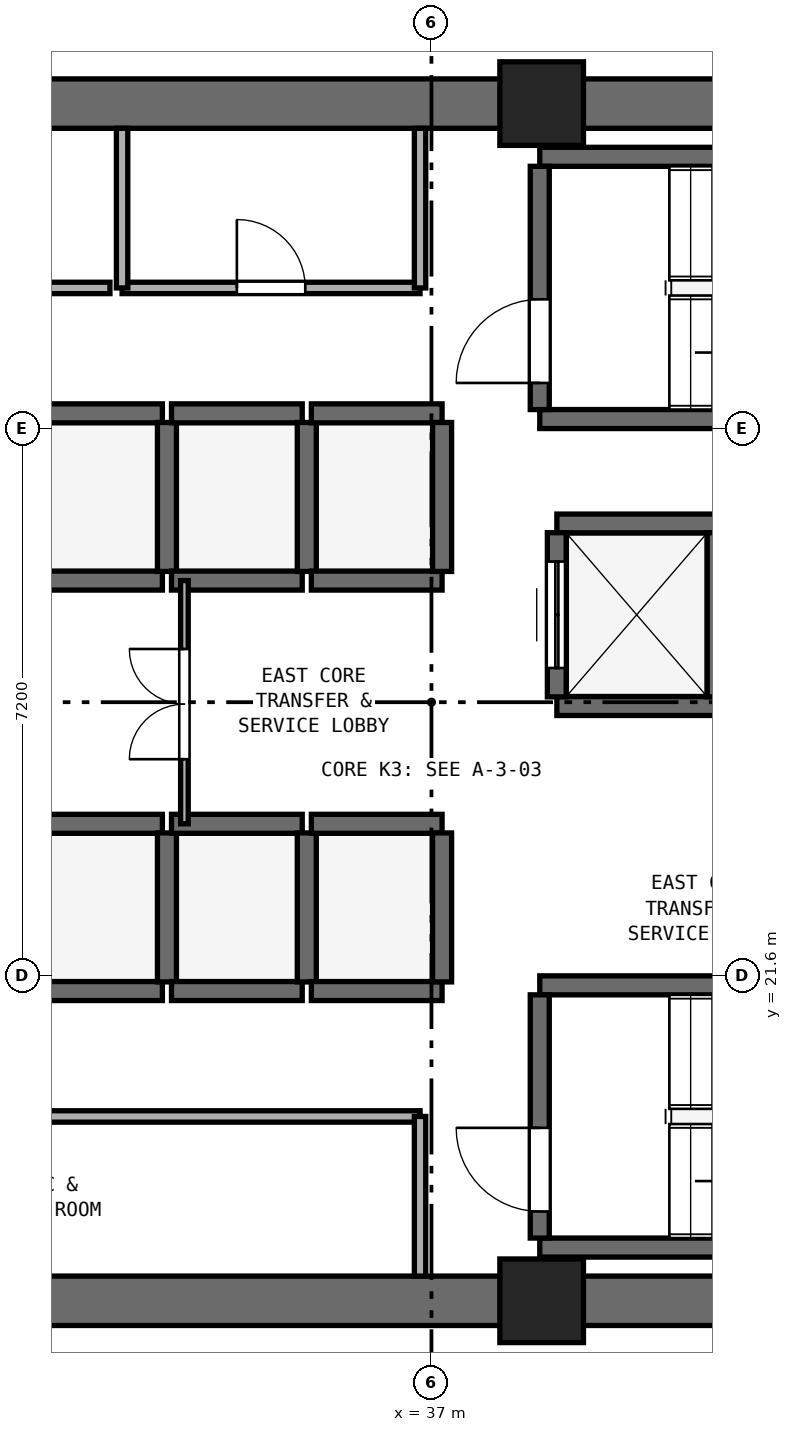
"""IFC4 building model, lengths in metres.
Left out: names, types, materials, properties, quantities, classifications, styles, units other than length and angle.
Written with IfcOpenShell. Run it as: python <this file> out.ifc"""

import sys

from ifc_helpers import new_model, si_unit, direction, frame, frame_2d, origin, origin_2d, place, context, subcontext, project, spatial, rectangle, extrude, element, fill, save


model = new_model("IFC4")
c1 = context("Model", 3, precision=1e-05, world=origin(), true_north=direction((0.0, 1.0)))
c2 = subcontext(c1, "Body", "Model", "MODEL_VIEW")
j1 = project(units=[si_unit("LENGTHUNIT", "METRE"), si_unit("PLANEANGLEUNIT", "RADIAN")], contexts=[c1])
p1 = place(None, origin())
s1 = spatial("IfcSite", under=j1, at=p1, CompositionType="ELEMENT")
p2 = place(p1, origin())
s2 = spatial("IfcBuilding", under=s1, at=p2, CompositionType="ELEMENT")
p3 = place(p2, frame((0.0, 0.0, 93.4)))
s3 = spatial("IfcBuildingStorey", under=s2, at=p3, CompositionType="ELEMENT", Elevation=93.4)
for number, where, z_axis, x_axis in (
    (1, (25.4, 17.325, 0.0), (0.0, 0.0, 1.0), (1.0, 0.0, 0.0)),
    (2, (25.4, 33.075, 0.0), (0.0, 0.0, 1.0), (1.0, 0.0, 0.0)),
):
    element("IfcWall", number, at=place(p3, frame(where, z_axis=z_axis, x_axis=x_axis)), inside=s3, PredefinedType="SHEAR", context=c2, shape_type="SweptSolid", body=[
        extrude(rectangle(XDim=23.2, YDim=0.65, at=frame_2d((11.6, 0.0))), origin(), (0.0, 0.0, 1.0), 3.525),
    ])
for number, where, z_axis, x_axis in (
    (3, (38.45, 17.325, 0.0), (0.0, 0.0, 1.0), (1.0, 0.0, 0.0)),
    (4, (38.45, 33.075, 0.0), (0.0, 0.0, 1.0), (1.0, 0.0, 0.0)),
):
    element("IfcColumn", number, at=place(p3, frame(where, z_axis=z_axis, x_axis=x_axis)), inside=s3, PredefinedType="PILASTER", context=c2, shape_type="SweptSolid", body=[
        extrude(rectangle(XDim=1.1, YDim=1.1, at=origin_2d()), origin(), (0.0, 0.0, 1.0), 3.8),
    ])
for number, where, z_axis, x_axis in (
    (5, (38.425, 28.925, 0.0), (0.0, 0.0, 1.0), (1.0, 0.0, 0.0)),
    (6, (38.425, 32.375, 0.0), (0.0, 0.0, 1.0), (1.0, 0.0, 0.0)),
):
    element("IfcWall", number, at=place(p3, frame(where, z_axis=z_axis, x_axis=x_axis)), inside=s3, PredefinedType="SHEAR", context=c2, shape_type="SweptSolid", body=[
        extrude(rectangle(XDim=7.3, YDim=0.25, at=frame_2d((3.65, 0.0))), origin(), (0.0, 0.0, 1.0), 3.525),
    ])
p4 = place(p3, frame((38.425, 29.05, 0.0), z_axis=(0.0, 0.0, 1.0), x_axis=(0.0, 1.0, 0.0)))
e7 = element("IfcWall", 7, at=p4, inside=s3, PredefinedType="SHEAR", context=c2, shape_type="SweptSolid", body=[
    extrude(rectangle(XDim=3.2, YDim=0.25, at=frame_2d((1.6, 0.0))), origin(), (0.0, 0.0, 1.0), 3.525),
])
p5 = place(p4, frame((0.35, 0.0, 0.0)))
e8 = element("IfcOpeningElement", 8, at=p5, cuts=e7, PredefinedType="OPENING", context=c2, shape_type="SweptSolid", body=[
    extrude(rectangle(XDim=1.1, YDim=2.15, at=frame_2d((0.55, 1.075))), frame((0.0, 0.135, 0.0), z_axis=(0.0, -1.0, 0.0), x_axis=(1.0, 0.0, 0.0)), (0.0, 0.0, 1.0), 0.27),
])
for number, where, z_axis, x_axis in (
    (9, (38.425, 18.025, 0.0), (0.0, 0.0, 1.0), (1.0, 0.0, 0.0)),
    (10, (38.425, 21.475, 0.0), (0.0, 0.0, 1.0), (1.0, 0.0, 0.0)),
):
    element("IfcWall", number, at=place(p3, frame(where, z_axis=z_axis, x_axis=x_axis)), inside=s3, PredefinedType="SHEAR", context=c2, shape_type="SweptSolid", body=[
        extrude(rectangle(XDim=7.3, YDim=0.25, at=frame_2d((3.65, 0.0))), origin(), (0.0, 0.0, 1.0), 3.525),
    ])
p6 = place(p3, frame((38.425, 18.15, 0.0), z_axis=(0.0, 0.0, 1.0), x_axis=(0.0, 1.0, 0.0)))
e11 = element("IfcWall", 11, at=p6, inside=s3, PredefinedType="SHEAR", context=c2, shape_type="SweptSolid", body=[
    extrude(rectangle(XDim=3.2, YDim=0.25, at=frame_2d((1.6, 0.0))), origin(), (0.0, 0.0, 1.0), 3.525),
])
p7 = place(p6, frame((0.35, 0.0, 0.0)))
e12 = element("IfcOpeningElement", 12, at=p7, cuts=e11, PredefinedType="OPENING", context=c2, shape_type="SweptSolid", body=[
    extrude(rectangle(XDim=1.1, YDim=2.15, at=frame_2d((0.55, 1.075))), frame((0.0, 0.135, 0.0), z_axis=(0.0, -1.0, 0.0), x_axis=(1.0, 0.0, 0.0)), (0.0, 0.0, 1.0), 0.27),
])
for number, where, z_axis, x_axis in (
    (13, (31.74, 21.4, 0.0), (0.0, 0.0, 1.0), (1.0, 0.0, 0.0)),
    (14, (31.74, 23.6, 0.0), (0.0, 0.0, 1.0), (1.0, 0.0, 0.0)),
):
    element("IfcWall", number, at=place(p3, frame(where, z_axis=z_axis, x_axis=x_axis)), inside=s3, PredefinedType="SHEAR", context=c2, shape_type="SweptSolid", body=[
        extrude(rectangle(XDim=1.72, YDim=0.25, at=frame_2d((0.86, 0.0))), origin(), (0.0, 0.0, 1.0), 3.525),
    ])
p8 = place(p3, frame((33.52, 21.52, 0.0), z_axis=(0.0, 0.0, 1.0), x_axis=(0.0, 1.0, 0.0)))
e15 = element("IfcWall", 15, at=p8, inside=s3, PredefinedType="SHEAR", context=c2, shape_type="SweptSolid", body=[
    extrude(rectangle(XDim=1.96, YDim=0.25, at=frame_2d((0.98, 0.0))), origin(), (0.0, 0.0, 1.0), 3.525),
])
for number, where, z_axis, x_axis in (
    (16, (33.58, 21.4, 0.0), (0.0, 0.0, 1.0), (1.0, 0.0, 0.0)),
    (17, (33.58, 23.6, 0.0), (0.0, 0.0, 1.0), (1.0, 0.0, 0.0)),
):
    element("IfcWall", number, at=place(p3, frame(where, z_axis=z_axis, x_axis=x_axis)), inside=s3, PredefinedType="SHEAR", context=c2, shape_type="SweptSolid", body=[
        extrude(rectangle(XDim=1.72, YDim=0.25, at=frame_2d((0.86, 0.0))), origin(), (0.0, 0.0, 1.0), 3.525),
    ])
p9 = place(p3, frame((35.36, 21.52, 0.0), z_axis=(0.0, 0.0, 1.0), x_axis=(0.0, 1.0, 0.0)))
e18 = element("IfcWall", 18, at=p9, inside=s3, PredefinedType="SHEAR", context=c2, shape_type="SweptSolid", body=[
    extrude(rectangle(XDim=1.96, YDim=0.25, at=frame_2d((0.98, 0.0))), origin(), (0.0, 0.0, 1.0), 3.525),
])
for number, where, z_axis, x_axis in (
    (19, (35.42, 21.4, 0.0), (0.0, 0.0, 1.0), (1.0, 0.0, 0.0)),
    (20, (35.42, 23.6, 0.0), (0.0, 0.0, 1.0), (1.0, 0.0, 0.0)),
):
    element("IfcWall", number, at=place(p3, frame(where, z_axis=z_axis, x_axis=x_axis)), inside=s3, PredefinedType="SHEAR", context=c2, shape_type="SweptSolid", body=[
        extrude(rectangle(XDim=1.72, YDim=0.25, at=frame_2d((0.86, 0.0))), origin(), (0.0, 0.0, 1.0), 3.525),
    ])
p10 = place(p3, frame((37.14, 21.52, 0.0), z_axis=(0.0, 0.0, 1.0), x_axis=(0.0, 1.0, 0.0)))
e21 = element("IfcWall", 21, at=p10, inside=s3, PredefinedType="SHEAR", context=c2, shape_type="SweptSolid", body=[
    extrude(rectangle(XDim=1.96, YDim=0.25, at=frame_2d((0.98, 0.0))), origin(), (0.0, 0.0, 1.0), 3.525),
])
for number, where, z_axis, x_axis in (
    (22, (31.74, 26.8, 0.0), (0.0, 0.0, 1.0), (1.0, 0.0, 0.0)),
    (23, (31.74, 29.0, 0.0), (0.0, 0.0, 1.0), (1.0, 0.0, 0.0)),
):
    element("IfcWall", number, at=place(p3, frame(where, z_axis=z_axis, x_axis=x_axis)), inside=s3, PredefinedType="SHEAR", context=c2, shape_type="SweptSolid", body=[
        extrude(rectangle(XDim=1.72, YDim=0.25, at=frame_2d((0.86, 0.0))), origin(), (0.0, 0.0, 1.0), 3.525),
    ])
p11 = place(p3, frame((33.52, 26.92, 0.0), z_axis=(0.0, 0.0, 1.0), x_axis=(0.0, 1.0, 0.0)))
e24 = element("IfcWall", 24, at=p11, inside=s3, PredefinedType="SHEAR", context=c2, shape_type="SweptSolid", body=[
    extrude(rectangle(XDim=1.96, YDim=0.25, at=frame_2d((0.98, 0.0))), origin(), (0.0, 0.0, 1.0), 3.525),
])
for number, where, z_axis, x_axis in (
    (25, (33.58, 26.8, 0.0), (0.0, 0.0, 1.0), (1.0, 0.0, 0.0)),
    (26, (33.58, 29.0, 0.0), (0.0, 0.0, 1.0), (1.0, 0.0, 0.0)),
):
    element("IfcWall", number, at=place(p3, frame(where, z_axis=z_axis, x_axis=x_axis)), inside=s3, PredefinedType="SHEAR", context=c2, shape_type="SweptSolid", body=[
        extrude(rectangle(XDim=1.72, YDim=0.25, at=frame_2d((0.86, 0.0))), origin(), (0.0, 0.0, 1.0), 3.525),
    ])
p12 = place(p3, frame((35.36, 26.92, 0.0), z_axis=(0.0, 0.0, 1.0), x_axis=(0.0, 1.0, 0.0)))
e27 = element("IfcWall", 27, at=p12, inside=s3, PredefinedType="SHEAR", context=c2, shape_type="SweptSolid", body=[
    extrude(rectangle(XDim=1.96, YDim=0.25, at=frame_2d((0.98, 0.0))), origin(), (0.0, 0.0, 1.0), 3.525),
])
for number, where, z_axis, x_axis in (
    (28, (35.42, 26.8, 0.0), (0.0, 0.0, 1.0), (1.0, 0.0, 0.0)),
    (29, (35.42, 29.0, 0.0), (0.0, 0.0, 1.0), (1.0, 0.0, 0.0)),
):
    element("IfcWall", number, at=place(p3, frame(where, z_axis=z_axis, x_axis=x_axis)), inside=s3, PredefinedType="SHEAR", context=c2, shape_type="SweptSolid", body=[
        extrude(rectangle(XDim=1.72, YDim=0.25, at=frame_2d((0.86, 0.0))), origin(), (0.0, 0.0, 1.0), 3.525),
    ])
p13 = place(p3, frame((37.14, 26.92, 0.0), z_axis=(0.0, 0.0, 1.0), x_axis=(0.0, 1.0, 0.0)))
e30 = element("IfcWall", 30, at=p13, inside=s3, PredefinedType="SHEAR", context=c2, shape_type="SweptSolid", body=[
    extrude(rectangle(XDim=1.96, YDim=0.25, at=frame_2d((0.98, 0.0))), origin(), (0.0, 0.0, 1.0), 3.525),
])
for number, where, z_axis, x_axis in (
    (31, (38.65, 25.15, 0.0), (0.0, 0.0, 1.0), (1.0, 0.0, 0.0)),
    (32, (38.65, 27.55, 0.0), (0.0, 0.0, 1.0), (1.0, 0.0, 0.0)),
):
    element("IfcWall", number, at=place(p3, frame(where, z_axis=z_axis, x_axis=x_axis)), inside=s3, PredefinedType="SHEAR", context=c2, shape_type="SweptSolid", body=[
        extrude(rectangle(XDim=2.1, YDim=0.25, at=frame_2d((1.05, 0.0))), origin(), (0.0, 0.0, 1.0), 3.525),
    ])
p14 = place(p3, frame((38.65, 25.27, 0.0), z_axis=(0.0, 0.0, 1.0), x_axis=(0.0, 1.0, 0.0)))
e33 = element("IfcWall", 33, at=p14, inside=s3, PredefinedType="SHEAR", context=c2, shape_type="SweptSolid", body=[
    extrude(rectangle(XDim=2.16, YDim=0.25, at=frame_2d((1.08, 0.0))), origin(), (0.0, 0.0, 1.0), 3.525),
])
p15 = place(p14, frame((0.38, 0.0, 0.0)))
e34 = element("IfcOpeningElement", 34, at=p15, cuts=e33, PredefinedType="OPENING", context=c2, shape_type="SweptSolid", body=[
    extrude(rectangle(XDim=1.4, YDim=2.2, at=frame_2d((0.7, 1.1))), frame((0.0, 0.135, 0.0), z_axis=(0.0, -1.0, 0.0), x_axis=(1.0, 0.0, 0.0)), (0.0, 0.0, 1.0), 0.27),
])
p16 = place(p3, frame((40.75, 25.27, 0.0), z_axis=(0.0, 0.0, 1.0), x_axis=(0.0, 1.0, 0.0)))
e35 = element("IfcWall", 35, at=p16, inside=s3, PredefinedType="SHEAR", context=c2, shape_type="SweptSolid", body=[
    extrude(rectangle(XDim=2.16, YDim=0.25, at=frame_2d((1.08, 0.0))), origin(), (0.0, 0.0, 1.0), 3.525),
])
p17 = place(p3, frame((29.53, 30.65, 0.0), z_axis=(0.0, 0.0, 1.0), x_axis=(1.0, 0.0, 0.0)))
e36 = element("IfcWall", 36, at=p17, inside=s3, PredefinedType="PARTITIONING", context=c2, shape_type="SweptSolid", body=[
    extrude(rectangle(XDim=3.24, YDim=0.15, at=frame_2d((1.62, 0.0))), origin(), (0.0, 0.0, 1.0), 3.525),
])
p18 = place(p17, frame((1.145, 0.0, 0.0)))
e37 = element("IfcOpeningElement", 37, at=p18, cuts=e36, PredefinedType="OPENING", context=c2, shape_type="SweptSolid", body=[
    extrude(rectangle(XDim=0.95, YDim=2.1, at=frame_2d((0.475, 1.05))), frame((0.0, 0.085, 0.0), z_axis=(0.0, -1.0, 0.0), x_axis=(1.0, 0.0, 0.0)), (0.0, 0.0, 1.0), 0.17),
])
p19 = place(p3, frame((32.93, 30.65, 0.0), z_axis=(0.0, 0.0, 1.0), x_axis=(1.0, 0.0, 0.0)))
e38 = element("IfcWall", 38, at=p19, inside=s3, PredefinedType="PARTITIONING", context=c2, shape_type="SweptSolid", body=[
    extrude(rectangle(XDim=3.92, YDim=0.15, at=frame_2d((1.96, 0.0))), origin(), (0.0, 0.0, 1.0), 3.525),
])
p20 = place(p19, frame((1.51, 0.0, 0.0)))
e39 = element("IfcOpeningElement", 39, at=p20, cuts=e38, PredefinedType="OPENING", context=c2, shape_type="SweptSolid", body=[
    extrude(rectangle(XDim=0.9, YDim=2.1, at=frame_2d((0.45, 1.05))), frame((0.0, 0.085, 0.0), z_axis=(0.0, -1.0, 0.0), x_axis=(1.0, 0.0, 0.0)), (0.0, 0.0, 1.0), 0.17),
])
for number, where, z_axis, x_axis in (
    (40, (32.93, 30.65, 0.0), (0.0, 0.0, 1.0), (0.0, 1.0, 0.0)),
    (41, (36.85, 30.65, 0.0), (0.0, 0.0, 1.0), (0.0, 1.0, 0.0)),
):
    element("IfcWall", number, at=place(p3, frame(where, z_axis=z_axis, x_axis=x_axis)), inside=s3, PredefinedType="PARTITIONING", context=c2, shape_type="SweptSolid", body=[
        extrude(rectangle(XDim=2.1, YDim=0.15, at=frame_2d((1.05, 0.0))), origin(), (0.0, 0.0, 1.0), 3.525),
    ])
p21 = place(p3, frame((26.17, 19.75, 0.0), z_axis=(0.0, 0.0, 1.0), x_axis=(1.0, 0.0, 0.0)))
e42 = element("IfcWall", 42, at=p21, inside=s3, PredefinedType="PARTITIONING", context=c2, shape_type="SweptSolid", body=[
    extrude(rectangle(XDim=10.68, YDim=0.15, at=frame_2d((5.34, 0.0))), origin(), (0.0, 0.0, 1.0), 3.525),
])
p22 = place(p21, frame((4.865, 0.0, 0.0)))
e43 = element("IfcOpeningElement", 43, at=p22, cuts=e42, PredefinedType="OPENING", context=c2, shape_type="SweptSolid", body=[
    extrude(rectangle(XDim=0.95, YDim=2.1, at=frame_2d((0.475, 1.05))), frame((0.0, 0.085, 0.0), z_axis=(0.0, -1.0, 0.0), x_axis=(1.0, 0.0, 0.0)), (0.0, 0.0, 1.0), 0.17),
])
p23 = place(p3, frame((36.85, 17.65, 0.0), z_axis=(0.0, 0.0, 1.0), x_axis=(0.0, 1.0, 0.0)))
e44 = element("IfcWall", 44, at=p23, inside=s3, PredefinedType="PARTITIONING", context=c2, shape_type="SweptSolid", body=[
    extrude(rectangle(XDim=2.1, YDim=0.15, at=frame_2d((1.05, 0.0))), origin(), (0.0, 0.0, 1.0), 3.525),
])
p24 = place(p3, frame((33.75, 23.6, 0.0), z_axis=(0.0, 0.0, 1.0), x_axis=(0.0, 1.0, 0.0)))
e45 = element("IfcWall", 45, at=p24, inside=s3, PredefinedType="PARTITIONING", context=c2, shape_type="SweptSolid", body=[
    extrude(rectangle(XDim=3.2, YDim=0.1, at=frame_2d((1.6, 0.0))), origin(), (0.0, 0.0, 1.0), 3.525),
])
p25 = place(p24, frame((0.85, 0.0, 0.0)))
e46 = element("IfcOpeningElement", 46, at=p25, cuts=e45, PredefinedType="OPENING", context=c2, shape_type="SweptSolid", body=[
    extrude(rectangle(XDim=1.45, YDim=2.12, at=frame_2d((0.725, 1.06))), frame((0.0, 0.06, 0.0), z_axis=(0.0, -1.0, 0.0), x_axis=(1.0, 0.0, 0.0)), (0.0, 0.0, 1.0), 0.12),
])
p26 = place(p5, origin())
e47 = element("IfcDoor", 47, at=p26, inside=s3, OperationType="SINGLE_SWING_LEFT", PredefinedType="DOOR", context=c2, shape_type="SweptSolid", body=[
    extrude(rectangle(XDim=1.1, YDim=2.15, at=frame_2d((0.55, 1.075))), frame((0.0, 0.025, 0.0), z_axis=(0.0, -1.0, 0.0), x_axis=(1.0, 0.0, 0.0)), (0.0, 0.0, 1.0), 0.05),
])
fill(e8, e47)
p27 = place(p7, origin())
e48 = element("IfcDoor", 48, at=p27, inside=s3, OperationType="SINGLE_SWING_RIGHT", PredefinedType="DOOR", context=c2, shape_type="SweptSolid", body=[
    extrude(rectangle(XDim=1.1, YDim=2.15, at=frame_2d((0.55, 1.075))), frame((0.0, 0.025, 0.0), z_axis=(0.0, -1.0, 0.0), x_axis=(1.0, 0.0, 0.0)), (0.0, 0.0, 1.0), 0.05),
])
fill(e12, e48)
p28 = place(p15, origin())
e49 = element("IfcDoor", 49, at=p28, inside=s3, OperationType="DOUBLE_DOOR_SLIDING", PredefinedType="DOOR", context=c2, shape_type="SweptSolid", body=[
    extrude(rectangle(XDim=1.4, YDim=2.2, at=frame_2d((0.7, 1.1))), frame((0.0, 0.025, 0.0), z_axis=(0.0, -1.0, 0.0), x_axis=(1.0, 0.0, 0.0)), (0.0, 0.0, 1.0), 0.05),
])
fill(e34, e49)
p29 = place(p20, origin())
e50 = element("IfcDoor", 50, at=p29, inside=s3, OperationType="SINGLE_SWING_LEFT", PredefinedType="DOOR", context=c2, shape_type="SweptSolid", body=[
    extrude(rectangle(XDim=0.9, YDim=2.1, at=frame_2d((0.45, 1.05))), frame((0.0, 0.025, 0.0), z_axis=(0.0, -1.0, 0.0), x_axis=(1.0, 0.0, 0.0)), (0.0, 0.0, 1.0), 0.05),
])
fill(e39, e50)
p30 = place(p25, origin())
e51 = element("IfcDoor", 51, at=p30, inside=s3, OperationType="DOUBLE_DOOR_SINGLE_SWING", PredefinedType="DOOR", context=c2, shape_type="SweptSolid", body=[
    extrude(rectangle(XDim=1.45, YDim=2.12, at=frame_2d((0.725, 1.06))), frame((0.0, 0.025, 0.0), z_axis=(0.0, -1.0, 0.0), x_axis=(1.0, 0.0, 0.0)), (0.0, 0.0, 1.0), 0.05),
])
fill(e46, e51)
save(model, sys.argv[1])
